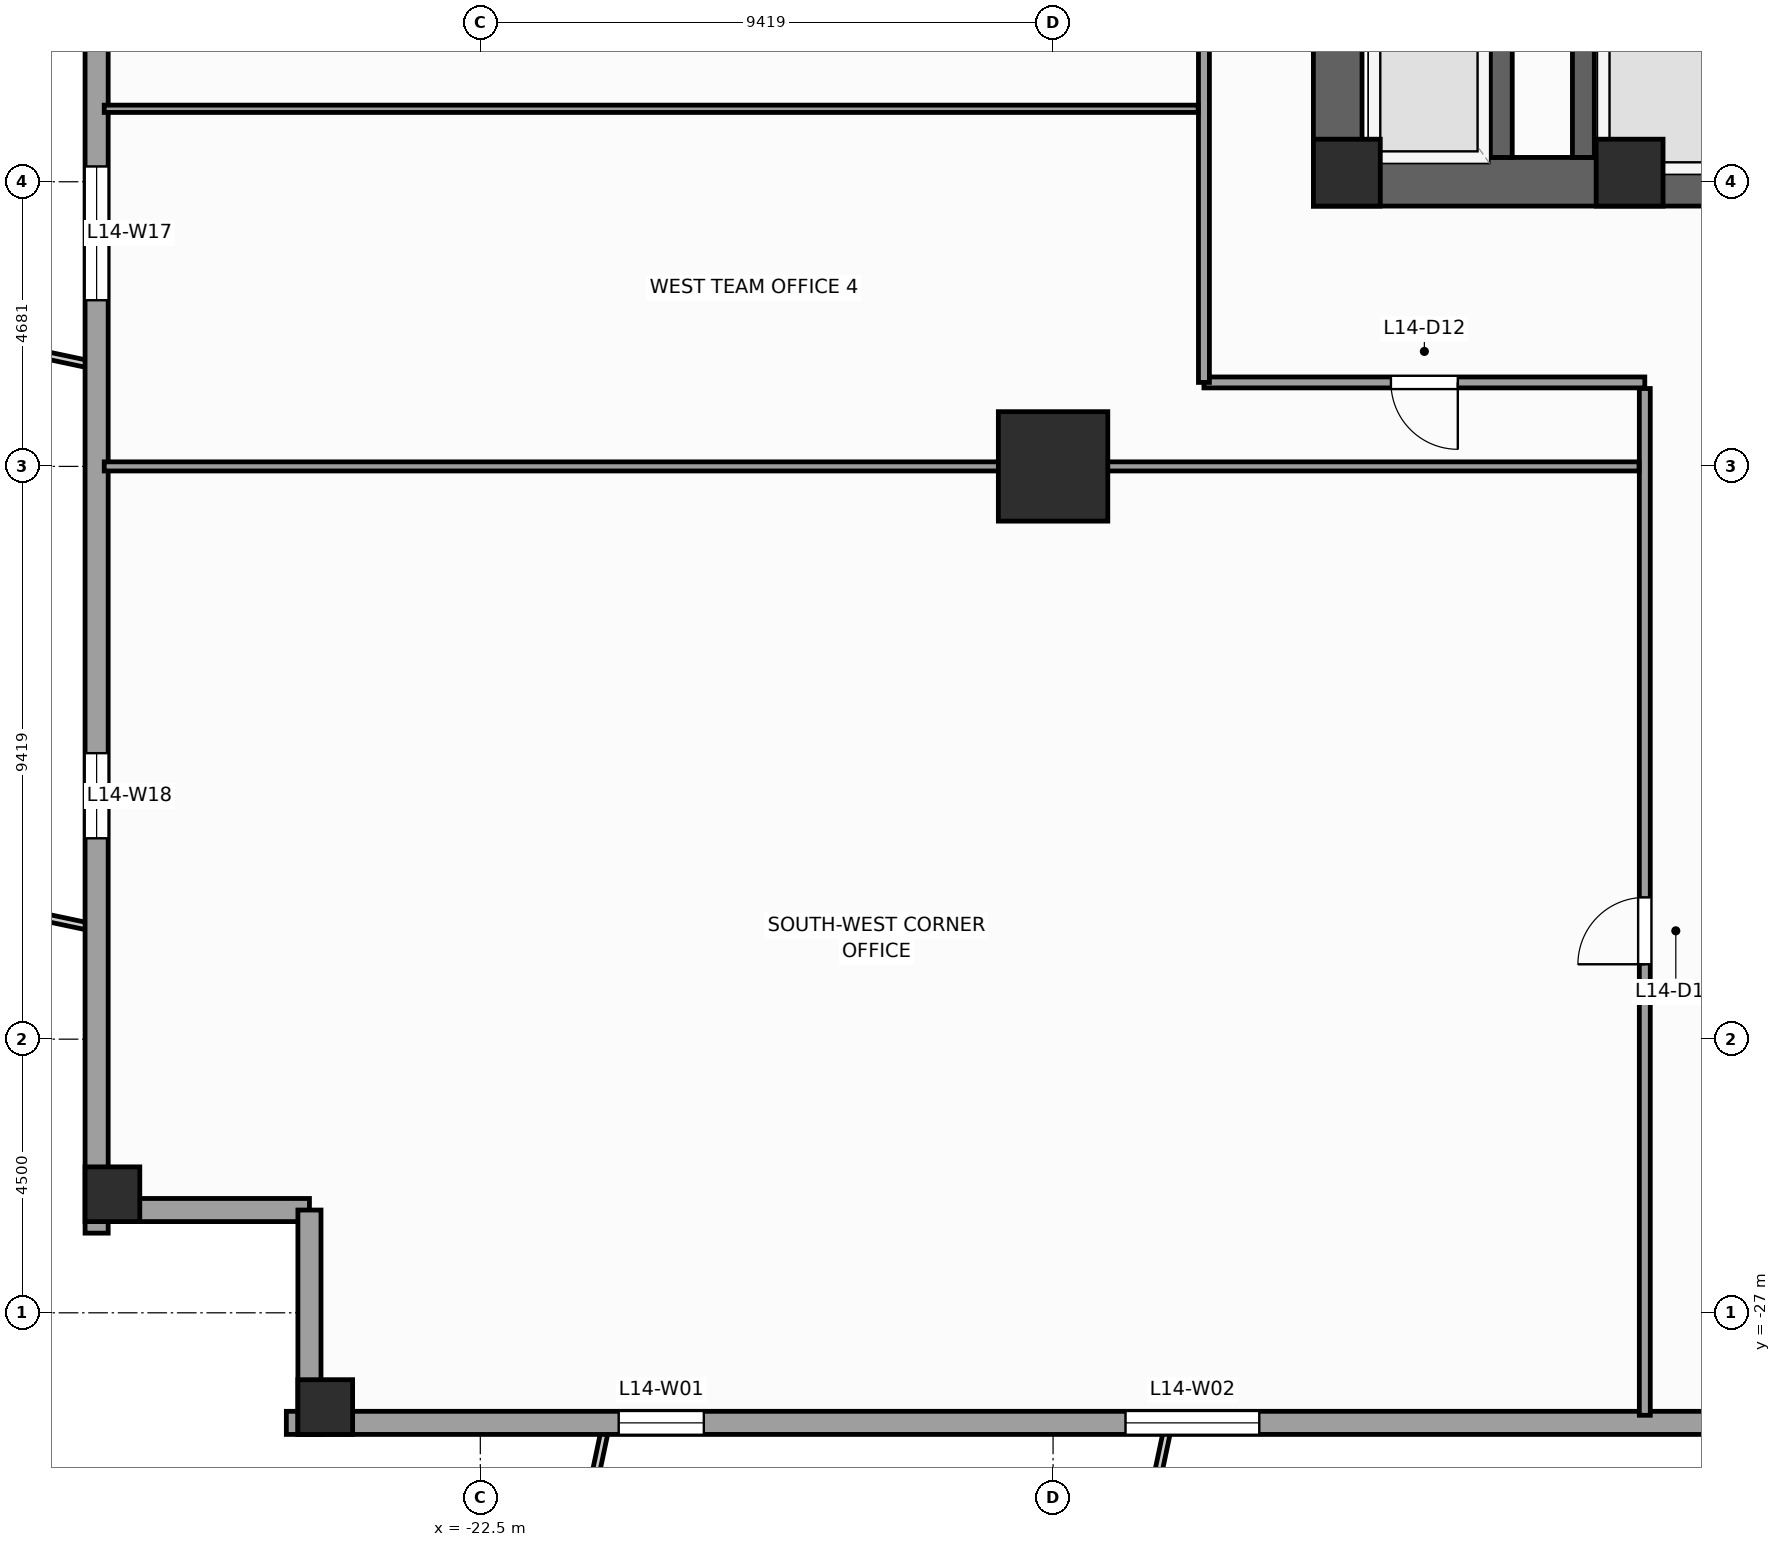
"""IFC4 building model, lengths in metres.
Left out: names, types, materials, properties, quantities, classifications, styles, units other than length and angle.
Written with IfcOpenShell. Run it as: python <this file> out.ifc"""

import sys

from ifc_helpers import new_model, si_unit, direction, frame, frame_2d, origin, origin_2d, place, context, subcontext, project, spatial, rectangle, extrude, source, transform, mapped, element, fill, save


model = new_model("IFC4")
c1 = context("Model", 3, precision=1e-05, world=origin(), true_north=direction((0.0, 1.0)))
c2 = subcontext(c1, "Body", "Model", "MODEL_VIEW")
j1 = project(units=[si_unit("LENGTHUNIT", "METRE"), si_unit("PLANEANGLEUNIT", "RADIAN")], contexts=[c1])
p1 = place(None, origin())
s1 = spatial("IfcSite", under=j1, at=p1, CompositionType="ELEMENT")
p2 = place(p1, origin())
s2 = spatial("IfcBuilding", under=s1, at=p2, CompositionType="ELEMENT")
p3 = place(p2, frame((0.0, 0.0, 62.0)))
s3 = spatial("IfcBuildingStorey", under=s2, at=p3, CompositionType="ELEMENT", Elevation=62.0)
p4 = place(p3, frame((-8.8, -8.4, 0.0), z_axis=(0.0, 0.0, 1.0), x_axis=(1.0, 0.0, 0.0)))
e1 = element("IfcWall", 1, at=p4, inside=s3, PredefinedType="SHEAR", context=c2, shape_type="SweptSolid", body=[
    extrude(rectangle(XDim=17.6, YDim=0.8, at=frame_2d((8.8, 0.0))), origin(), (0.0, 0.0, 1.0), 4.0),
])
p5 = place(p4, frame((8.15, 0.0, 0.0)))
e2 = element("IfcOpeningElement", 2, at=p5, cuts=e1, PredefinedType="OPENING", context=c2, shape_type="SweptSolid", body=[
    extrude(rectangle(XDim=1.3, YDim=2.2, at=frame_2d((0.65, 1.1))), frame((0.0, 0.41, 0.0), z_axis=(0.0, -1.0, 0.0), x_axis=(1.0, 0.0, 0.0)), (0.0, 0.0, 1.0), 0.82),
])
p6 = place(p3, frame((-8.4, -8.0, 0.0), z_axis=(0.0, 0.0, 1.0), x_axis=(0.0, 1.0, 0.0)))
e3 = element("IfcWall", 3, at=p6, inside=s3, PredefinedType="SHEAR", context=c2, shape_type="SweptSolid", body=[
    extrude(rectangle(XDim=16.0, YDim=0.8, at=frame_2d((8.0, 0.0))), origin(), (0.0, 0.0, 1.0), 4.0),
])
p7 = place(p6, frame((4.69, 0.0, 0.0)))
e4 = element("IfcOpeningElement", 4, at=p7, cuts=e3, PredefinedType="OPENING", context=c2, shape_type="SweptSolid", body=[
    extrude(rectangle(XDim=1.3, YDim=2.2, at=frame_2d((0.65, 1.1))), frame((0.0, 0.41, 0.0), z_axis=(0.0, -1.0, 0.0), x_axis=(1.0, 0.0, 0.0)), (0.0, 0.0, 1.0), 0.82),
])
p8 = place(p3, frame((-4.36, -8.0, 0.0), z_axis=(0.0, 0.0, 1.0), x_axis=(0.0, 1.0, 0.0)))
e5 = element("IfcWall", 5, at=p8, inside=s3, PredefinedType="SHEAR", context=c2, shape_type="SweptSolid", body=[
    extrude(rectangle(XDim=16.0, YDim=0.36, at=frame_2d((8.0, 0.0))), origin(), (0.0, 0.0, 1.0), 4.0),
])
p9 = place(p3, frame((-5.71, -8.0, 0.0), z_axis=(0.0, 0.0, 1.0), x_axis=(0.0, 1.0, 0.0)))
e6 = element("IfcWall", 6, at=p9, inside=s3, PredefinedType="SHEAR", context=c2, shape_type="SweptSolid", body=[
    extrude(rectangle(XDim=2.54, YDim=0.36, at=frame_2d((1.27, 0.0))), origin(), (0.0, 0.0, 1.0), 4.0),
])
m1 = source(origin(), c2, "Body", "SweptSolid", [
    extrude(rectangle(XDim=1.1, YDim=1.1, at=origin_2d()), origin(), (0.0, 0.0, 1.0), 4.0),
])
for number, where, z_axis, x_axis in (
    (7, (-8.25, -8.25, 0.0), (0.0, 0.0, 1.0), (1.0, 0.0, 0.0)),
    (8, (-3.6, -8.25, 0.0), (0.0, 0.0, 1.0), (1.0, 0.0, 0.0)),
):
    element("IfcColumn", number, at=place(p3, frame(where, z_axis=z_axis, x_axis=x_axis)), inside=s3, PredefinedType="PILASTER", context=c2, shape_type="MappedRepresentation", body=[
        mapped(m1, transform((0.0, 0.0, 0.0), scale=1.0)),
    ])
m2 = source(origin(), c2, "Body", "SweptSolid", [
    extrude(rectangle(XDim=1.8, YDim=1.8, at=origin_2d()), origin(), (0.0, 0.0, 1.0), 4.0),
])
p10 = place(p3, frame((-13.081, -13.081, 0.0), z_axis=(0.0, 0.0, 1.0), x_axis=(1.0, 0.0, 0.0)))
e9 = element("IfcColumn", 9, at=p10, inside=s3, PredefinedType="COLUMN", context=c2, shape_type="MappedRepresentation", body=[
    mapped(m2, transform((0.0, 0.0, 0.0), scale=1.0)),
])
m3 = source(origin(), c2, "Body", "SweptSolid", [
    extrude(rectangle(XDim=0.9, YDim=0.9, at=origin_2d()), origin(), (0.0, 0.0, 1.0), 4.0),
])
for number, where, z_axis, x_axis in (
    (10, (-25.05, -28.55, 0.0), (0.0, 0.0, 1.0), (1.0, 0.0, 0.0)),
    (11, (-28.55, -25.05, 0.0), (0.0, 0.0, 1.0), (1.0, 0.0, 0.0)),
):
    element("IfcColumn", number, at=place(p3, frame(where, z_axis=z_axis, x_axis=x_axis)), inside=s3, PredefinedType="COLUMN", context=c2, shape_type="MappedRepresentation", body=[
        mapped(m3, transform((0.0, 0.0, 0.0), scale=1.0)),
    ])
p11 = place(p3, frame((-25.69, -28.81, 0.0), z_axis=(0.0, 0.0, 1.0), x_axis=(1.0, 0.0, 0.0)))
e12 = element("IfcWall", 12, at=p11, inside=s3, PredefinedType="STANDARD", context=c2, shape_type="SweptSolid", body=[
    extrude(rectangle(XDim=51.38, YDim=0.38, at=frame_2d((25.69, 0.0))), origin(), (0.0, 0.0, 1.0), 3.12),
])
p12 = place(p11, frame((30.765, 0.0, 0.0)))
e13 = element("IfcOpeningElement", 13, at=p12, cuts=e12, PredefinedType="OPENING", context=c2, shape_type="SweptSolid", body=[
    extrude(rectangle(XDim=1.05, YDim=2.25, at=frame_2d((0.525, 1.125))), frame((0.0, 0.2, 0.0), z_axis=(0.0, -1.0, 0.0), x_axis=(1.0, 0.0, 0.0)), (0.0, 0.0, 1.0), 0.4),
])
p13 = place(p11, frame((5.466, 0.0, 0.49)))
e14 = element("IfcOpeningElement", 14, at=p13, cuts=e12, PredefinedType="OPENING", context=c2, shape_type="SweptSolid", body=[
    extrude(rectangle(XDim=1.4, YDim=2.4, at=frame_2d((0.7, 1.2))), frame((0.0, 0.2, 0.0), z_axis=(0.0, -1.0, 0.0), x_axis=(1.0, 0.0, 0.0)), (0.0, 0.0, 1.0), 0.4),
])
p14 = place(p11, frame((13.8, 0.0, 0.49)))
e15 = element("IfcOpeningElement", 15, at=p14, cuts=e12, PredefinedType="OPENING", context=c2, shape_type="SweptSolid", body=[
    extrude(rectangle(XDim=2.2, YDim=2.4, at=frame_2d((1.1, 1.2))), frame((0.0, 0.2, 0.0), z_axis=(0.0, -1.0, 0.0), x_axis=(1.0, 0.0, 0.0)), (0.0, 0.0, 1.0), 0.4),
])
p15 = place(p11, frame((33.838, 0.0, 0.49)))
e16 = element("IfcOpeningElement", 16, at=p15, cuts=e12, PredefinedType="OPENING", context=c2, shape_type="SweptSolid", body=[
    extrude(rectangle(XDim=2.2, YDim=2.4, at=frame_2d((1.1, 1.2))), frame((0.0, 0.2, 0.0), z_axis=(0.0, -1.0, 0.0), x_axis=(1.0, 0.0, 0.0)), (0.0, 0.0, 1.0), 0.4),
])
p16 = place(p11, frame((43.487, 0.0, 0.49)))
e17 = element("IfcOpeningElement", 17, at=p16, cuts=e12, PredefinedType="OPENING", context=c2, shape_type="SweptSolid", body=[
    extrude(rectangle(XDim=1.4, YDim=2.4, at=frame_2d((0.7, 1.2))), frame((0.0, 0.2, 0.0), z_axis=(0.0, -1.0, 0.0), x_axis=(1.0, 0.0, 0.0)), (0.0, 0.0, 1.0), 0.4),
])
p17 = place(p3, frame((-28.81, 25.69, 0.0), z_axis=(0.0, 0.0, 1.0), x_axis=(0.0, -1.0, 0.0)))
e18 = element("IfcWall", 18, at=p17, inside=s3, PredefinedType="STANDARD", context=c2, shape_type="SweptSolid", body=[
    extrude(rectangle(XDim=51.38, YDim=0.38, at=frame_2d((25.69, 0.0))), origin(), (0.0, 0.0, 1.0), 3.12),
])
p18 = place(p17, frame((5.466, 0.0, 0.49)))
e19 = element("IfcOpeningElement", 19, at=p18, cuts=e18, PredefinedType="OPENING", context=c2, shape_type="SweptSolid", body=[
    extrude(rectangle(XDim=1.4, YDim=2.4, at=frame_2d((0.7, 1.2))), frame((0.0, 0.2, 0.0), z_axis=(0.0, -1.0, 0.0), x_axis=(1.0, 0.0, 0.0)), (0.0, 0.0, 1.0), 0.4),
])
p19 = place(p17, frame((13.8, 0.0, 0.49)))
e20 = element("IfcOpeningElement", 20, at=p19, cuts=e18, PredefinedType="OPENING", context=c2, shape_type="SweptSolid", body=[
    extrude(rectangle(XDim=2.2, YDim=2.4, at=frame_2d((1.1, 1.2))), frame((0.0, 0.2, 0.0), z_axis=(0.0, -1.0, 0.0), x_axis=(1.0, 0.0, 0.0)), (0.0, 0.0, 1.0), 0.4),
])
p20 = place(p17, frame((33.838, 0.0, 0.49)))
e21 = element("IfcOpeningElement", 21, at=p20, cuts=e18, PredefinedType="OPENING", context=c2, shape_type="SweptSolid", body=[
    extrude(rectangle(XDim=2.2, YDim=2.4, at=frame_2d((1.1, 1.2))), frame((0.0, 0.2, 0.0), z_axis=(0.0, -1.0, 0.0), x_axis=(1.0, 0.0, 0.0)), (0.0, 0.0, 1.0), 0.4),
])
p21 = place(p17, frame((43.487, 0.0, 0.49)))
e22 = element("IfcOpeningElement", 22, at=p21, cuts=e18, PredefinedType="OPENING", context=c2, shape_type="SweptSolid", body=[
    extrude(rectangle(XDim=1.4, YDim=2.4, at=frame_2d((0.7, 1.2))), frame((0.0, 0.2, 0.0), z_axis=(0.0, -1.0, 0.0), x_axis=(1.0, 0.0, 0.0)), (0.0, 0.0, 1.0), 0.4),
])
p22 = place(p3, frame((-28.81, -25.31, 0.0), z_axis=(0.0, 0.0, 1.0), x_axis=(1.0, 0.0, 0.0)))
e23 = element("IfcWall", 23, at=p22, inside=s3, PredefinedType="STANDARD", context=c2, shape_type="SweptSolid", body=[
    extrude(rectangle(XDim=3.5, YDim=0.38, at=frame_2d((1.75, 0.0))), origin(), (0.0, 0.0, 1.0), 3.72),
])
p23 = place(p3, frame((-25.31, -25.31, 0.0), z_axis=(0.0, 0.0, 1.0), x_axis=(0.0, -1.0, 0.0)))
e24 = element("IfcWall", 24, at=p23, inside=s3, PredefinedType="STANDARD", context=c2, shape_type="SweptSolid", body=[
    extrude(rectangle(XDim=3.69, YDim=0.38, at=frame_2d((1.845, 0.0))), origin(), (0.0, 0.0, 1.0), 3.72),
])
p24 = place(p3, frame((-10.6, -11.7, 0.0), z_axis=(0.0, 0.0, 1.0), x_axis=(1.0, 0.0, 0.0)))
e25 = element("IfcWall", 25, at=p24, inside=s3, PredefinedType="PARTITIONING", context=c2, shape_type="SweptSolid", body=[
    extrude(rectangle(XDim=7.25, YDim=0.18, at=frame_2d((3.625, 0.0))), origin(), (0.0, 0.0, 1.0), 3.72),
])
p25 = place(p24, frame((3.075, 0.0, 0.0)))
e26 = element("IfcOpeningElement", 26, at=p25, cuts=e25, PredefinedType="OPENING", context=c2, shape_type="SweptSolid", body=[
    extrude(rectangle(XDim=1.1, YDim=2.2, at=frame_2d((0.55, 1.1))), frame((0.0, 0.1, 0.0), z_axis=(0.0, -1.0, 0.0), x_axis=(1.0, 0.0, 0.0)), (0.0, 0.0, 1.0), 0.2),
])
p26 = place(p3, frame((-10.6, -11.7, 0.0), z_axis=(0.0, 0.0, 1.0), x_axis=(0.0, 1.0, 0.0)))
e27 = element("IfcWall", 27, at=p26, inside=s3, PredefinedType="PARTITIONING", context=c2, shape_type="SweptSolid", body=[
    extrude(rectangle(XDim=12.75, YDim=0.18, at=frame_2d((6.375, 0.0))), origin(), (0.0, 0.0, 1.0), 3.72),
])
p27 = place(p3, frame((-3.35, -28.685, 0.0), z_axis=(0.0, 0.0, 1.0), x_axis=(0.0, 1.0, 0.0)))
e28 = element("IfcWall", 28, at=p27, inside=s3, PredefinedType="PARTITIONING", context=c2, shape_type="SweptSolid", body=[
    extrude(rectangle(XDim=16.885, YDim=0.18, at=frame_2d((8.442, 0.0))), origin(), (0.0, 0.0, 1.0), 3.72),
])
p28 = place(p27, frame((7.417, 0.0, 0.0)))
e29 = element("IfcOpeningElement", 29, at=p28, cuts=e28, PredefinedType="OPENING", context=c2, shape_type="SweptSolid", body=[
    extrude(rectangle(XDim=1.1, YDim=2.2, at=frame_2d((0.55, 1.1))), frame((0.0, 0.1, 0.0), z_axis=(0.0, -1.0, 0.0), x_axis=(1.0, 0.0, 0.0)), (0.0, 0.0, 1.0), 0.2),
])
p29 = place(p3, frame((-28.685, -13.081, 0.0), z_axis=(0.0, 0.0, 1.0), x_axis=(1.0, 0.0, 0.0)))
e30 = element("IfcWall", 30, at=p29, inside=s3, PredefinedType="PARTITIONING", context=c2, shape_type="SweptSolid", body=[
    extrude(rectangle(XDim=25.24, YDim=0.15, at=frame_2d((12.62, 0.0))), origin(), (0.0, 0.0, 1.0), 2.712),
])
p30 = place(p3, frame((-28.685, -7.2, 0.0), z_axis=(0.0, 0.0, 1.0), x_axis=(1.0, 0.0, 0.0)))
e31 = element("IfcWall", 31, at=p30, inside=s3, PredefinedType="PARTITIONING", context=c2, shape_type="SweptSolid", body=[
    extrude(rectangle(XDim=17.99, YDim=0.12, at=frame_2d((8.995, 0.0))), origin(), (0.0, 0.0, 1.0), 3.72),
])
m4 = source(origin(), c2, "Body", "SweptSolid", [
    extrude(rectangle(XDim=1.4, YDim=2.4, at=frame_2d((0.7, 1.2))), frame((0.0, 0.03, 0.0), z_axis=(0.0, -1.0, 0.0), x_axis=(1.0, 0.0, 0.0)), (0.0, 0.0, 1.0), 0.06),
])
p31 = place(p13, origin())
e32 = element("IfcWindow", 32, at=p31, inside=s3, PartitioningType="SINGLE_PANEL", PredefinedType="WINDOW", context=c2, shape_type="MappedRepresentation", body=[
    mapped(m4, transform((0.0, 0.0, 0.0), scale=1.0)),
])
fill(e14, e32)
m5 = source(origin(), c2, "Body", "SweptSolid", [
    extrude(rectangle(XDim=2.2, YDim=2.4, at=frame_2d((1.1, 1.2))), frame((0.0, 0.03, 0.0), z_axis=(0.0, -1.0, 0.0), x_axis=(1.0, 0.0, 0.0)), (0.0, 0.0, 1.0), 0.06),
])
p32 = place(p14, origin())
e33 = element("IfcWindow", 33, at=p32, inside=s3, PartitioningType="SINGLE_PANEL", PredefinedType="WINDOW", context=c2, shape_type="MappedRepresentation", body=[
    mapped(m5, transform((0.0, 0.0, 0.0), scale=1.0)),
])
fill(e15, e33)
p33 = place(p20, origin())
e34 = element("IfcWindow", 34, at=p33, inside=s3, PartitioningType="SINGLE_PANEL", PredefinedType="WINDOW", context=c2, shape_type="MappedRepresentation", body=[
    mapped(m5, transform((0.0, 0.0, 0.0), scale=1.0)),
])
fill(e21, e34)
p34 = place(p21, origin())
e35 = element("IfcWindow", 35, at=p34, inside=s3, PartitioningType="SINGLE_PANEL", PredefinedType="WINDOW", context=c2, shape_type="MappedRepresentation", body=[
    mapped(m4, transform((0.0, 0.0, 0.0), scale=1.0)),
])
fill(e22, e35)
m6 = source(origin(), c2, "Body", "SweptSolid", [
    extrude(rectangle(XDim=1.1, YDim=2.2, at=frame_2d((0.55, 1.1))), frame((0.0, 0.025, 0.0), z_axis=(0.0, -1.0, 0.0), x_axis=(1.0, 0.0, 0.0)), (0.0, 0.0, 1.0), 0.05),
])
p35 = place(p25, frame((1.1, 0.0, 0.0), z_axis=(0.0, 0.0, 1.0), x_axis=(-1.0, 0.0, 0.0)))
e36 = element("IfcDoor", 36, at=p35, inside=s3, OperationType="SINGLE_SWING_RIGHT", PredefinedType="DOOR", context=c2, shape_type="MappedRepresentation", body=[
    mapped(m6, transform((0.0, 0.0, 0.0), scale=1.0)),
])
fill(e26, e36)
p36 = place(p28, origin())
e37 = element("IfcDoor", 37, at=p36, inside=s3, OperationType="SINGLE_SWING_LEFT", PredefinedType="DOOR", context=c2, shape_type="MappedRepresentation", body=[
    mapped(m6, transform((0.0, 0.0, 0.0), scale=1.0)),
])
fill(e29, e37)
save(model, sys.argv[1])
